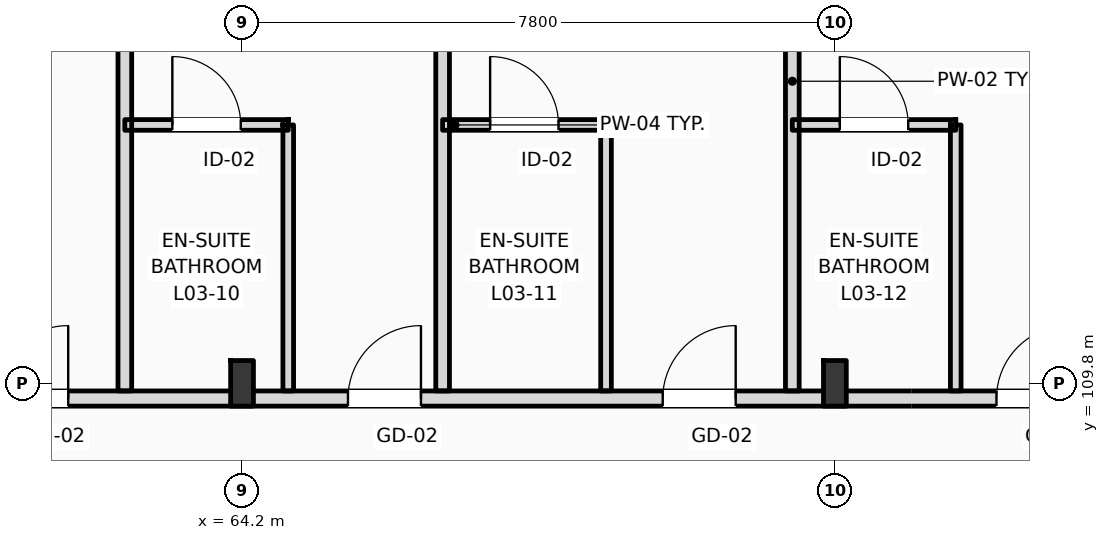
"""IFC4 building model, lengths in metres.
Left out: names, types, materials, properties, quantities, classifications, styles, units other than length and angle.
Written with IfcOpenShell. Run it as: python <this file> out.ifc"""

import sys

from ifc_helpers import new_model, si_unit, direction, frame, frame_2d, origin, origin_2d, place, context, subcontext, project, spatial, rectangle, i_section, extrude, element, fill, save


model = new_model("IFC4")
c1 = context("Model", 3, precision=1e-05, world=origin(), true_north=direction((0.0, 1.0)))
c2 = subcontext(c1, "Body", "Model", "MODEL_VIEW")
j1 = project(units=[si_unit("LENGTHUNIT", "METRE"), si_unit("PLANEANGLEUNIT", "RADIAN")], contexts=[c1])
p1 = place(None, origin())
s1 = spatial("IfcSite", under=j1, at=p1, CompositionType="ELEMENT")
p2 = place(p1, origin())
s2 = spatial("IfcBuilding", under=s1, at=p2, CompositionType="ELEMENT")
p3 = place(p2, frame((0.0, 0.0, 16.2)))
s3 = spatial("IfcBuildingStorey", under=s2, at=p3, CompositionType="ELEMENT", Elevation=16.2)
for number, where, z_axis, x_axis in (
    (1, (64.2, 109.8, 0.0), (0.0, 0.0, 1.0), (1.0, 0.0, 0.0)),
    (2, (72.0, 109.8, 0.0), (0.0, 0.0, 1.0), (1.0, 0.0, 0.0)),
):
    element("IfcColumn", number, at=place(p3, frame(where, z_axis=z_axis, x_axis=x_axis)), inside=s3, PredefinedType="COLUMN", context=c2, shape_type="SweptSolid", body=[
        extrude(i_section(OverallWidth=0.3, OverallDepth=0.6, WebThickness=0.015, FlangeThickness=0.03, FilletRadius=0.027, at=origin_2d()), origin(), (0.0, 0.0, 1.0), 4.2),
    ])
p4 = place(p3, frame((10.65, 109.6, 0.0), z_axis=(0.0, 0.0, 1.0), x_axis=(1.0, 0.0, 0.0)))
e3 = element("IfcWall", 3, at=p4, inside=s3, PredefinedType="PARTITIONING", context=c2, shape_type="SweptSolid", body=[
    extrude(rectangle(XDim=109.21, YDim=0.2, at=frame_2d((54.605, 0.0))), origin(), (0.0, 0.0, 1.0), 3.36),
])
p5 = place(p4, frame((15.43, 0.0, 0.0)))
e4 = element("IfcOpeningElement", 4, at=p5, cuts=e3, PredefinedType="OPENING", context=c2, shape_type="SweptSolid", body=[
    extrude(rectangle(XDim=1.02, YDim=2.2, at=frame_2d((0.51, 1.1))), frame((0.0, 0.11, 0.0), z_axis=(0.0, -1.0, 0.0), x_axis=(1.0, 0.0, 0.0)), (0.0, 0.0, 1.0), 0.22),
])
p6 = place(p4, frame((19.537, 0.0, 0.0)))
e5 = element("IfcOpeningElement", 5, at=p6, cuts=e3, PredefinedType="OPENING", context=c2, shape_type="SweptSolid", body=[
    extrude(rectangle(XDim=1.02, YDim=2.2, at=frame_2d((0.51, 1.1))), frame((0.0, 0.11, 0.0), z_axis=(0.0, -1.0, 0.0), x_axis=(1.0, 0.0, 0.0)), (0.0, 0.0, 1.0), 0.22),
])
p7 = place(p4, frame((23.928, 0.0, 0.0)))
e6 = element("IfcOpeningElement", 6, at=p7, cuts=e3, PredefinedType="OPENING", context=c2, shape_type="SweptSolid", body=[
    extrude(rectangle(XDim=1.02, YDim=2.2, at=frame_2d((0.51, 1.1))), frame((0.0, 0.11, 0.0), z_axis=(0.0, -1.0, 0.0), x_axis=(1.0, 0.0, 0.0)), (0.0, 0.0, 1.0), 0.22),
])
p8 = place(p4, frame((26.169, 0.0, 0.0)))
e7 = element("IfcOpeningElement", 7, at=p8, cuts=e3, PredefinedType="OPENING", context=c2, shape_type="SweptSolid", body=[
    extrude(rectangle(XDim=1.02, YDim=2.2, at=frame_2d((0.51, 1.1))), frame((0.0, 0.11, 0.0), z_axis=(0.0, -1.0, 0.0), x_axis=(1.0, 0.0, 0.0)), (0.0, 0.0, 1.0), 0.22),
])
p9 = place(p4, frame((32.739, 0.0, 0.0)))
e8 = element("IfcOpeningElement", 8, at=p9, cuts=e3, PredefinedType="OPENING", context=c2, shape_type="SweptSolid", body=[
    extrude(rectangle(XDim=0.96, YDim=2.2, at=frame_2d((0.48, 1.1))), frame((0.0, 0.11, 0.0), z_axis=(0.0, -1.0, 0.0), x_axis=(1.0, 0.0, 0.0)), (0.0, 0.0, 1.0), 0.22),
])
p10 = place(p4, frame((34.98, 0.0, 0.0)))
e9 = element("IfcOpeningElement", 9, at=p10, cuts=e3, PredefinedType="OPENING", context=c2, shape_type="SweptSolid", body=[
    extrude(rectangle(XDim=0.96, YDim=2.2, at=frame_2d((0.48, 1.1))), frame((0.0, 0.11, 0.0), z_axis=(0.0, -1.0, 0.0), x_axis=(1.0, 0.0, 0.0)), (0.0, 0.0, 1.0), 0.22),
])
p11 = place(p4, frame((41.521, 0.0, 0.0)))
e10 = element("IfcOpeningElement", 10, at=p11, cuts=e3, PredefinedType="OPENING", context=c2, shape_type="SweptSolid", body=[
    extrude(rectangle(XDim=0.96, YDim=2.2, at=frame_2d((0.48, 1.1))), frame((0.0, 0.11, 0.0), z_axis=(0.0, -1.0, 0.0), x_axis=(1.0, 0.0, 0.0)), (0.0, 0.0, 1.0), 0.22),
])
p12 = place(p4, frame((43.512, 0.0, 0.0)))
e11 = element("IfcOpeningElement", 11, at=p12, cuts=e3, PredefinedType="OPENING", context=c2, shape_type="SweptSolid", body=[
    extrude(rectangle(XDim=0.96, YDim=2.2, at=frame_2d((0.48, 1.1))), frame((0.0, 0.11, 0.0), z_axis=(0.0, -1.0, 0.0), x_axis=(1.0, 0.0, 0.0)), (0.0, 0.0, 1.0), 0.22),
])
p13 = place(p4, frame((50.303, 0.0, 0.0)))
e12 = element("IfcOpeningElement", 12, at=p13, cuts=e3, PredefinedType="OPENING", context=c2, shape_type="SweptSolid", body=[
    extrude(rectangle(XDim=0.96, YDim=2.2, at=frame_2d((0.48, 1.1))), frame((0.0, 0.11, 0.0), z_axis=(0.0, -1.0, 0.0), x_axis=(1.0, 0.0, 0.0)), (0.0, 0.0, 1.0), 0.22),
])
p14 = place(p4, frame((54.944, 0.0, 0.0)))
e13 = element("IfcOpeningElement", 13, at=p14, cuts=e3, PredefinedType="OPENING", context=c2, shape_type="SweptSolid", body=[
    extrude(rectangle(XDim=0.96, YDim=2.2, at=frame_2d((0.48, 1.1))), frame((0.0, 0.11, 0.0), z_axis=(0.0, -1.0, 0.0), x_axis=(1.0, 0.0, 0.0)), (0.0, 0.0, 1.0), 0.22),
])
p15 = place(p4, frame((59.085, 0.0, 0.0)))
e14 = element("IfcOpeningElement", 14, at=p15, cuts=e3, PredefinedType="OPENING", context=c2, shape_type="SweptSolid", body=[
    extrude(rectangle(XDim=0.96, YDim=2.2, at=frame_2d((0.48, 1.1))), frame((0.0, 0.11, 0.0), z_axis=(0.0, -1.0, 0.0), x_axis=(1.0, 0.0, 0.0)), (0.0, 0.0, 1.0), 0.22),
])
p16 = place(p4, frame((63.476, 0.0, 0.0)))
e15 = element("IfcOpeningElement", 15, at=p16, cuts=e3, PredefinedType="OPENING", context=c2, shape_type="SweptSolid", body=[
    extrude(rectangle(XDim=0.96, YDim=2.2, at=frame_2d((0.48, 1.1))), frame((0.0, 0.11, 0.0), z_axis=(0.0, -1.0, 0.0), x_axis=(1.0, 0.0, 0.0)), (0.0, 0.0, 1.0), 0.22),
])
p17 = place(p4, frame((65.716, 0.0, 0.0)))
e16 = element("IfcOpeningElement", 16, at=p17, cuts=e3, PredefinedType="OPENING", context=c2, shape_type="SweptSolid", body=[
    extrude(rectangle(XDim=0.96, YDim=2.2, at=frame_2d((0.48, 1.1))), frame((0.0, 0.11, 0.0), z_axis=(0.0, -1.0, 0.0), x_axis=(1.0, 0.0, 0.0)), (0.0, 0.0, 1.0), 0.22),
])
p18 = place(p4, frame((72.257, 0.0, 0.0)))
e17 = element("IfcOpeningElement", 17, at=p18, cuts=e3, PredefinedType="OPENING", context=c2, shape_type="SweptSolid", body=[
    extrude(rectangle(XDim=0.96, YDim=2.2, at=frame_2d((0.48, 1.1))), frame((0.0, 0.11, 0.0), z_axis=(0.0, -1.0, 0.0), x_axis=(1.0, 0.0, 0.0)), (0.0, 0.0, 1.0), 0.22),
])
p19 = place(p4, frame((74.498, 0.0, 0.0)))
e18 = element("IfcOpeningElement", 18, at=p19, cuts=e3, PredefinedType="OPENING", context=c2, shape_type="SweptSolid", body=[
    extrude(rectangle(XDim=0.96, YDim=2.2, at=frame_2d((0.48, 1.1))), frame((0.0, 0.11, 0.0), z_axis=(0.0, -1.0, 0.0), x_axis=(1.0, 0.0, 0.0)), (0.0, 0.0, 1.0), 0.22),
])
p20 = place(p4, frame((81.039, 0.0, 0.0)))
e19 = element("IfcOpeningElement", 19, at=p20, cuts=e3, PredefinedType="OPENING", context=c2, shape_type="SweptSolid", body=[
    extrude(rectangle(XDim=0.96, YDim=2.2, at=frame_2d((0.48, 1.1))), frame((0.0, 0.11, 0.0), z_axis=(0.0, -1.0, 0.0), x_axis=(1.0, 0.0, 0.0)), (0.0, 0.0, 1.0), 0.22),
])
p21 = place(p4, frame((85.68, 0.0, 0.0)))
e20 = element("IfcOpeningElement", 20, at=p21, cuts=e3, PredefinedType="OPENING", context=c2, shape_type="SweptSolid", body=[
    extrude(rectangle(XDim=0.96, YDim=2.2, at=frame_2d((0.48, 1.1))), frame((0.0, 0.11, 0.0), z_axis=(0.0, -1.0, 0.0), x_axis=(1.0, 0.0, 0.0)), (0.0, 0.0, 1.0), 0.22),
])
p22 = place(p4, frame((89.82, 0.0, 0.0)))
e21 = element("IfcOpeningElement", 21, at=p22, cuts=e3, PredefinedType="OPENING", context=c2, shape_type="SweptSolid", body=[
    extrude(rectangle(XDim=0.96, YDim=2.2, at=frame_2d((0.48, 1.1))), frame((0.0, 0.11, 0.0), z_axis=(0.0, -1.0, 0.0), x_axis=(1.0, 0.0, 0.0)), (0.0, 0.0, 1.0), 0.22),
])
p23 = place(p4, frame((94.211, 0.0, 0.0)))
e22 = element("IfcOpeningElement", 22, at=p23, cuts=e3, PredefinedType="OPENING", context=c2, shape_type="SweptSolid", body=[
    extrude(rectangle(XDim=0.96, YDim=2.2, at=frame_2d((0.48, 1.1))), frame((0.0, 0.11, 0.0), z_axis=(0.0, -1.0, 0.0), x_axis=(1.0, 0.0, 0.0)), (0.0, 0.0, 1.0), 0.22),
])
p24 = place(p4, frame((98.602, 0.0, 0.0)))
e23 = element("IfcOpeningElement", 23, at=p24, cuts=e3, PredefinedType="OPENING", context=c2, shape_type="SweptSolid", body=[
    extrude(rectangle(XDim=0.96, YDim=2.2, at=frame_2d((0.48, 1.1))), frame((0.0, 0.11, 0.0), z_axis=(0.0, -1.0, 0.0), x_axis=(1.0, 0.0, 0.0)), (0.0, 0.0, 1.0), 0.22),
])
p25 = place(p4, frame((102.993, 0.0, 0.0)))
e24 = element("IfcOpeningElement", 24, at=p25, cuts=e3, PredefinedType="OPENING", context=c2, shape_type="SweptSolid", body=[
    extrude(rectangle(XDim=0.96, YDim=2.2, at=frame_2d((0.48, 1.1))), frame((0.0, 0.11, 0.0), z_axis=(0.0, -1.0, 0.0), x_axis=(1.0, 0.0, 0.0)), (0.0, 0.0, 1.0), 0.22),
])
p26 = place(p4, frame((105.269, 0.0, 0.0)))
e25 = element("IfcOpeningElement", 25, at=p26, cuts=e3, PredefinedType="OPENING", context=c2, shape_type="SweptSolid", body=[
    extrude(rectangle(XDim=0.96, YDim=2.2, at=frame_2d((0.48, 1.1))), frame((0.0, 0.11, 0.0), z_axis=(0.0, -1.0, 0.0), x_axis=(1.0, 0.0, 0.0)), (0.0, 0.0, 1.0), 0.22),
])
p27 = place(p4, frame((2.716, 0.0, 0.0)))
e26 = element("IfcOpeningElement", 26, at=p27, cuts=e3, PredefinedType="OPENING", context=c2, shape_type="SweptSolid", body=[
    extrude(rectangle(XDim=1.35, YDim=2.25, at=frame_2d((0.675, 1.125))), frame((0.0, 0.11, 0.0), z_axis=(0.0, -1.0, 0.0), x_axis=(1.0, 0.0, 0.0)), (0.0, 0.0, 1.0), 0.22),
])
p28 = place(p4, frame((6.65, 0.0, 0.0)))
e27 = element("IfcOpeningElement", 27, at=p28, cuts=e3, PredefinedType="OPENING", context=c2, shape_type="SweptSolid", body=[
    extrude(rectangle(XDim=1.35, YDim=2.25, at=frame_2d((0.675, 1.125))), frame((0.0, 0.11, 0.0), z_axis=(0.0, -1.0, 0.0), x_axis=(1.0, 0.0, 0.0)), (0.0, 0.0, 1.0), 0.22),
])
p29 = place(p4, frame((10.583, 0.0, 0.0)))
e28 = element("IfcOpeningElement", 28, at=p29, cuts=e3, PredefinedType="OPENING", context=c2, shape_type="SweptSolid", body=[
    extrude(rectangle(XDim=1.35, YDim=2.25, at=frame_2d((0.675, 1.125))), frame((0.0, 0.11, 0.0), z_axis=(0.0, -1.0, 0.0), x_axis=(1.0, 0.0, 0.0)), (0.0, 0.0, 1.0), 0.22),
])
p30 = place(p3, frame((62.658, 109.7, 0.0), z_axis=(0.0, 0.0, 1.0), x_axis=(0.0, 1.0, 0.0)))
e29 = element("IfcWall", 29, at=p30, inside=s3, PredefinedType="PARTITIONING", context=c2, shape_type="SweptSolid", body=[
    extrude(rectangle(XDim=8.15, YDim=0.18, at=frame_2d((4.075, 0.0))), origin(), (0.0, 0.0, 1.0), 3.92),
])
p31 = place(p3, frame((66.839, 109.7, 0.0), z_axis=(0.0, 0.0, 1.0), x_axis=(0.0, 1.0, 0.0)))
e30 = element("IfcWall", 30, at=p31, inside=s3, PredefinedType="PARTITIONING", context=c2, shape_type="SweptSolid", body=[
    extrude(rectangle(XDim=8.15, YDim=0.18, at=frame_2d((4.075, 0.0))), origin(), (0.0, 0.0, 1.0), 3.61),
])
p32 = place(p3, frame((64.808, 109.7, 0.0), z_axis=(0.0, 0.0, 1.0), x_axis=(0.0, 1.0, 0.0)))
e31 = element("IfcWall", 31, at=p32, inside=s3, PredefinedType="PARTITIONING", context=c2, shape_type="SweptSolid", body=[
    extrude(rectangle(XDim=3.5, YDim=0.14, at=frame_2d((1.75, 0.0))), origin(), (0.0, 0.0, 1.0), 3.92),
])
p33 = place(p3, frame((62.658, 113.2, 0.0), z_axis=(0.0, 0.0, 1.0), x_axis=(1.0, 0.0, 0.0)))
e32 = element("IfcWall", 32, at=p33, inside=s3, PredefinedType="PARTITIONING", context=c2, shape_type="SweptSolid", body=[
    extrude(rectangle(XDim=2.15, YDim=0.14, at=frame_2d((1.075, 0.0))), origin(), (0.0, 0.0, 1.0), 3.92),
])
p34 = place(p33, frame((0.625, 0.0, 0.0)))
e33 = element("IfcOpeningElement", 33, at=p34, cuts=e32, PredefinedType="OPENING", context=c2, shape_type="SweptSolid", body=[
    extrude(rectangle(XDim=0.9, YDim=2.1, at=frame_2d((0.45, 1.05))), frame((0.0, 0.08, 0.0), z_axis=(0.0, -1.0, 0.0), x_axis=(1.0, 0.0, 0.0)), (0.0, 0.0, 1.0), 0.16),
])
p35 = place(p3, frame((71.44, 109.7, 0.0), z_axis=(0.0, 0.0, 1.0), x_axis=(0.0, 1.0, 0.0)))
e34 = element("IfcWall", 34, at=p35, inside=s3, PredefinedType="PARTITIONING", context=c2, shape_type="SweptSolid", body=[
    extrude(rectangle(XDim=8.15, YDim=0.18, at=frame_2d((4.075, 0.0))), origin(), (0.0, 0.0, 1.0), 3.92),
])
p36 = place(p3, frame((68.989, 109.7, 0.0), z_axis=(0.0, 0.0, 1.0), x_axis=(0.0, 1.0, 0.0)))
e35 = element("IfcWall", 35, at=p36, inside=s3, PredefinedType="PARTITIONING", context=c2, shape_type="SweptSolid", body=[
    extrude(rectangle(XDim=3.5, YDim=0.14, at=frame_2d((1.75, 0.0))), origin(), (0.0, 0.0, 1.0), 3.92),
])
p37 = place(p3, frame((66.839, 113.2, 0.0), z_axis=(0.0, 0.0, 1.0), x_axis=(1.0, 0.0, 0.0)))
e36 = element("IfcWall", 36, at=p37, inside=s3, PredefinedType="PARTITIONING", context=c2, shape_type="SweptSolid", body=[
    extrude(rectangle(XDim=2.15, YDim=0.14, at=frame_2d((1.075, 0.0))), origin(), (0.0, 0.0, 1.0), 3.92),
])
p38 = place(p37, frame((0.625, 0.0, 0.0)))
e37 = element("IfcOpeningElement", 37, at=p38, cuts=e36, PredefinedType="OPENING", context=c2, shape_type="SweptSolid", body=[
    extrude(rectangle(XDim=0.9, YDim=2.1, at=frame_2d((0.45, 1.05))), frame((0.0, 0.08, 0.0), z_axis=(0.0, -1.0, 0.0), x_axis=(1.0, 0.0, 0.0)), (0.0, 0.0, 1.0), 0.16),
])
p39 = place(p3, frame((73.59, 109.7, 0.0), z_axis=(0.0, 0.0, 1.0), x_axis=(0.0, 1.0, 0.0)))
e38 = element("IfcWall", 38, at=p39, inside=s3, PredefinedType="PARTITIONING", context=c2, shape_type="SweptSolid", body=[
    extrude(rectangle(XDim=3.5, YDim=0.14, at=frame_2d((1.75, 0.0))), origin(), (0.0, 0.0, 1.0), 3.92),
])
p40 = place(p3, frame((71.44, 113.2, 0.0), z_axis=(0.0, 0.0, 1.0), x_axis=(1.0, 0.0, 0.0)))
e39 = element("IfcWall", 39, at=p40, inside=s3, PredefinedType="PARTITIONING", context=c2, shape_type="SweptSolid", body=[
    extrude(rectangle(XDim=2.15, YDim=0.14, at=frame_2d((1.075, 0.0))), origin(), (0.0, 0.0, 1.0), 3.92),
])
p41 = place(p40, frame((0.625, 0.0, 0.0)))
e40 = element("IfcOpeningElement", 40, at=p41, cuts=e39, PredefinedType="OPENING", context=c2, shape_type="SweptSolid", body=[
    extrude(rectangle(XDim=0.9, YDim=2.1, at=frame_2d((0.45, 1.05))), frame((0.0, 0.08, 0.0), z_axis=(0.0, -1.0, 0.0), x_axis=(1.0, 0.0, 0.0)), (0.0, 0.0, 1.0), 0.16),
])
p42 = place(p13, origin())
e41 = element("IfcDoor", 41, at=p42, inside=s3, OperationType="SINGLE_SWING_RIGHT", PredefinedType="DOOR", context=c2, shape_type="SweptSolid", body=[
    extrude(rectangle(XDim=0.96, YDim=2.2, at=frame_2d((0.48, 1.1))), frame((0.0, 0.025, 0.0), z_axis=(0.0, -1.0, 0.0), x_axis=(1.0, 0.0, 0.0)), (0.0, 0.0, 1.0), 0.05),
])
fill(e12, e41)
p43 = place(p14, origin())
e42 = element("IfcDoor", 42, at=p43, inside=s3, OperationType="SINGLE_SWING_RIGHT", PredefinedType="DOOR", context=c2, shape_type="SweptSolid", body=[
    extrude(rectangle(XDim=0.96, YDim=2.2, at=frame_2d((0.48, 1.1))), frame((0.0, 0.025, 0.0), z_axis=(0.0, -1.0, 0.0), x_axis=(1.0, 0.0, 0.0)), (0.0, 0.0, 1.0), 0.05),
])
fill(e13, e42)
p44 = place(p34, origin())
e43 = element("IfcDoor", 43, at=p44, inside=s3, OperationType="SINGLE_SWING_LEFT", PredefinedType="DOOR", context=c2, shape_type="SweptSolid", body=[
    extrude(rectangle(XDim=0.9, YDim=2.1, at=frame_2d((0.45, 1.05))), frame((0.0, 0.025, 0.0), z_axis=(0.0, -1.0, 0.0), x_axis=(1.0, 0.0, 0.0)), (0.0, 0.0, 1.0), 0.05),
])
fill(e33, e43)
p45 = place(p15, origin())
e44 = element("IfcDoor", 44, at=p45, inside=s3, OperationType="SINGLE_SWING_RIGHT", PredefinedType="DOOR", context=c2, shape_type="SweptSolid", body=[
    extrude(rectangle(XDim=0.96, YDim=2.2, at=frame_2d((0.48, 1.1))), frame((0.0, 0.025, 0.0), z_axis=(0.0, -1.0, 0.0), x_axis=(1.0, 0.0, 0.0)), (0.0, 0.0, 1.0), 0.05),
])
fill(e14, e44)
p46 = place(p38, origin())
e45 = element("IfcDoor", 45, at=p46, inside=s3, OperationType="SINGLE_SWING_LEFT", PredefinedType="DOOR", context=c2, shape_type="SweptSolid", body=[
    extrude(rectangle(XDim=0.9, YDim=2.1, at=frame_2d((0.45, 1.05))), frame((0.0, 0.025, 0.0), z_axis=(0.0, -1.0, 0.0), x_axis=(1.0, 0.0, 0.0)), (0.0, 0.0, 1.0), 0.05),
])
fill(e37, e45)
p47 = place(p16, origin())
e46 = element("IfcDoor", 46, at=p47, inside=s3, OperationType="SINGLE_SWING_RIGHT", PredefinedType="DOOR", context=c2, shape_type="SweptSolid", body=[
    extrude(rectangle(XDim=0.96, YDim=2.2, at=frame_2d((0.48, 1.1))), frame((0.0, 0.025, 0.0), z_axis=(0.0, -1.0, 0.0), x_axis=(1.0, 0.0, 0.0)), (0.0, 0.0, 1.0), 0.05),
])
fill(e15, e46)
p48 = place(p41, origin())
e47 = element("IfcDoor", 47, at=p48, inside=s3, OperationType="SINGLE_SWING_LEFT", PredefinedType="DOOR", context=c2, shape_type="SweptSolid", body=[
    extrude(rectangle(XDim=0.9, YDim=2.1, at=frame_2d((0.45, 1.05))), frame((0.0, 0.025, 0.0), z_axis=(0.0, -1.0, 0.0), x_axis=(1.0, 0.0, 0.0)), (0.0, 0.0, 1.0), 0.05),
])
fill(e40, e47)
save(model, sys.argv[1])
